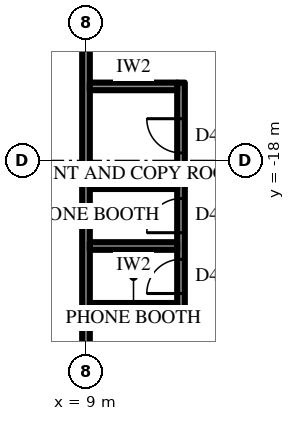
"""IFC4 building model, lengths in metres.
Left out: names, types, materials, properties, quantities, classifications, styles, units other than length and angle.
Written with IfcOpenShell. Run it as: python <this file> out.ifc"""

import sys

from ifc_helpers import new_model, si_unit, direction, frame, frame_2d, origin, place, context, subcontext, project, spatial, rectangle, extrude, element, fill, save


model = new_model("IFC4")
c1 = context("Model", 3, precision=1e-05, world=origin(), true_north=direction((0.0, 1.0)))
c2 = subcontext(c1, "Body", "Model", "MODEL_VIEW")
j1 = project(units=[si_unit("LENGTHUNIT", "METRE"), si_unit("PLANEANGLEUNIT", "RADIAN")], contexts=[c1])
p1 = place(None, origin())
s1 = spatial("IfcSite", under=j1, at=p1, CompositionType="ELEMENT")
p2 = place(p1, origin())
s2 = spatial("IfcBuilding", under=s1, at=p2, CompositionType="ELEMENT")
p3 = place(p2, frame((0.0, 0.0, 169.9)))
s3 = spatial("IfcBuildingStorey", under=s2, at=p3, CompositionType="ELEMENT", Elevation=169.9)
p4 = place(p3, frame((9.0, -12.3, 0.0), z_axis=(0.0, 0.0, 1.0), x_axis=(0.0, -1.0, 0.0)))
e1 = element("IfcWall", 1, at=p4, inside=s3, PredefinedType="PARTITIONING", context=c2, shape_type="SweptSolid", body=[
    extrude(rectangle(XDim=19.0, YDim=0.2, at=frame_2d((9.5, 0.0))), origin(), (0.0, 0.0, 1.0), 4.0),
])
p5 = place(p4, frame((1.4, 0.0, 0.0)))
e2 = element("IfcOpeningElement", 2, at=p5, cuts=e1, PredefinedType="OPENING", context=c2, shape_type="SweptSolid", body=[
    extrude(rectangle(XDim=1.0, YDim=2.2, at=frame_2d((0.5, 1.1))), frame((0.0, 0.11, 0.0), z_axis=(0.0, -1.0, 0.0), x_axis=(1.0, 0.0, 0.0)), (0.0, 0.0, 1.0), 0.22),
])
p6 = place(p3, frame((11.5, -15.95, 0.0), z_axis=(0.0, 0.0, 1.0), x_axis=(0.0, -1.0, 0.0)))
e3 = element("IfcWall", 3, at=p6, inside=s3, PredefinedType="PARTITIONING", context=c2, shape_type="SweptSolid", body=[
    extrude(rectangle(XDim=6.0, YDim=0.2, at=frame_2d((3.0, 0.0))), origin(), (0.0, 0.0, 1.0), 4.0),
])
p7 = place(p6, frame((0.95, 0.0, 0.0)))
e4 = element("IfcOpeningElement", 4, at=p7, cuts=e3, PredefinedType="OPENING", context=c2, shape_type="SweptSolid", body=[
    extrude(rectangle(XDim=0.9, YDim=2.2, at=frame_2d((0.45, 1.1))), frame((0.0, 0.11, 0.0), z_axis=(0.0, -1.0, 0.0), x_axis=(1.0, 0.0, 0.0)), (0.0, 0.0, 1.0), 0.22),
])
p8 = place(p6, frame((3.05, 0.0, 0.0)))
e5 = element("IfcOpeningElement", 5, at=p8, cuts=e3, PredefinedType="OPENING", context=c2, shape_type="SweptSolid", body=[
    extrude(rectangle(XDim=0.9, YDim=2.2, at=frame_2d((0.45, 1.1))), frame((0.0, 0.11, 0.0), z_axis=(0.0, -1.0, 0.0), x_axis=(1.0, 0.0, 0.0)), (0.0, 0.0, 1.0), 0.22),
])
p9 = place(p6, frame((4.65, 0.0, 0.0)))
e6 = element("IfcOpeningElement", 6, at=p9, cuts=e3, PredefinedType="OPENING", context=c2, shape_type="SweptSolid", body=[
    extrude(rectangle(XDim=0.9, YDim=2.2, at=frame_2d((0.45, 1.1))), frame((0.0, 0.11, 0.0), z_axis=(0.0, -1.0, 0.0), x_axis=(1.0, 0.0, 0.0)), (0.0, 0.0, 1.0), 0.22),
])
for number, where, z_axis, x_axis in (
    (7, (9.1, -16.05, 0.0), (0.0, 0.0, 1.0), (1.0, 0.0, 0.0)),
    (8, (9.1, -18.65, 0.0), (0.0, 0.0, 1.0), (1.0, 0.0, 0.0)),
    (9, (9.1, -20.25, 0.0), (0.0, 0.0, 1.0), (1.0, 0.0, 0.0)),
    (10, (9.1, -21.85, 0.0), (0.0, 0.0, 1.0), (1.0, 0.0, 0.0)),
):
    element("IfcWall", number, at=place(p3, frame(where, z_axis=z_axis, x_axis=x_axis)), inside=s3, PredefinedType="PARTITIONING", context=c2, shape_type="SweptSolid", body=[
        extrude(rectangle(XDim=2.3, YDim=0.2, at=frame_2d((1.15, 0.0))), origin(), (0.0, 0.0, 1.0), 4.0),
    ])
p10 = place(p7, frame((0.9, 0.0, 0.0), z_axis=(0.0, 0.0, 1.0), x_axis=(-1.0, 0.0, 0.0)))
e11 = element("IfcDoor", 11, at=p10, inside=s3, OperationType="SINGLE_SWING_LEFT", PredefinedType="DOOR", context=c2, shape_type="SweptSolid", body=[
    extrude(rectangle(XDim=0.9, YDim=2.2, at=frame_2d((0.45, 1.1))), frame((0.0, 0.025, 0.0), z_axis=(0.0, -1.0, 0.0), x_axis=(1.0, 0.0, 0.0)), (0.0, 0.0, 1.0), 0.05),
])
fill(e4, e11)
p11 = place(p8, frame((0.9, 0.0, 0.0), z_axis=(0.0, 0.0, 1.0), x_axis=(-1.0, 0.0, 0.0)))
e12 = element("IfcDoor", 12, at=p11, inside=s3, OperationType="SINGLE_SWING_RIGHT", PredefinedType="DOOR", context=c2, shape_type="SweptSolid", body=[
    extrude(rectangle(XDim=0.9, YDim=2.2, at=frame_2d((0.45, 1.1))), frame((0.0, 0.025, 0.0), z_axis=(0.0, -1.0, 0.0), x_axis=(1.0, 0.0, 0.0)), (0.0, 0.0, 1.0), 0.05),
])
fill(e5, e12)
p12 = place(p9, frame((0.9, 0.0, 0.0), z_axis=(0.0, 0.0, 1.0), x_axis=(-1.0, 0.0, 0.0)))
e13 = element("IfcDoor", 13, at=p12, inside=s3, OperationType="SINGLE_SWING_RIGHT", PredefinedType="DOOR", context=c2, shape_type="SweptSolid", body=[
    extrude(rectangle(XDim=0.9, YDim=2.2, at=frame_2d((0.45, 1.1))), frame((0.0, 0.025, 0.0), z_axis=(0.0, -1.0, 0.0), x_axis=(1.0, 0.0, 0.0)), (0.0, 0.0, 1.0), 0.05),
])
fill(e6, e13)
save(model, sys.argv[1])
